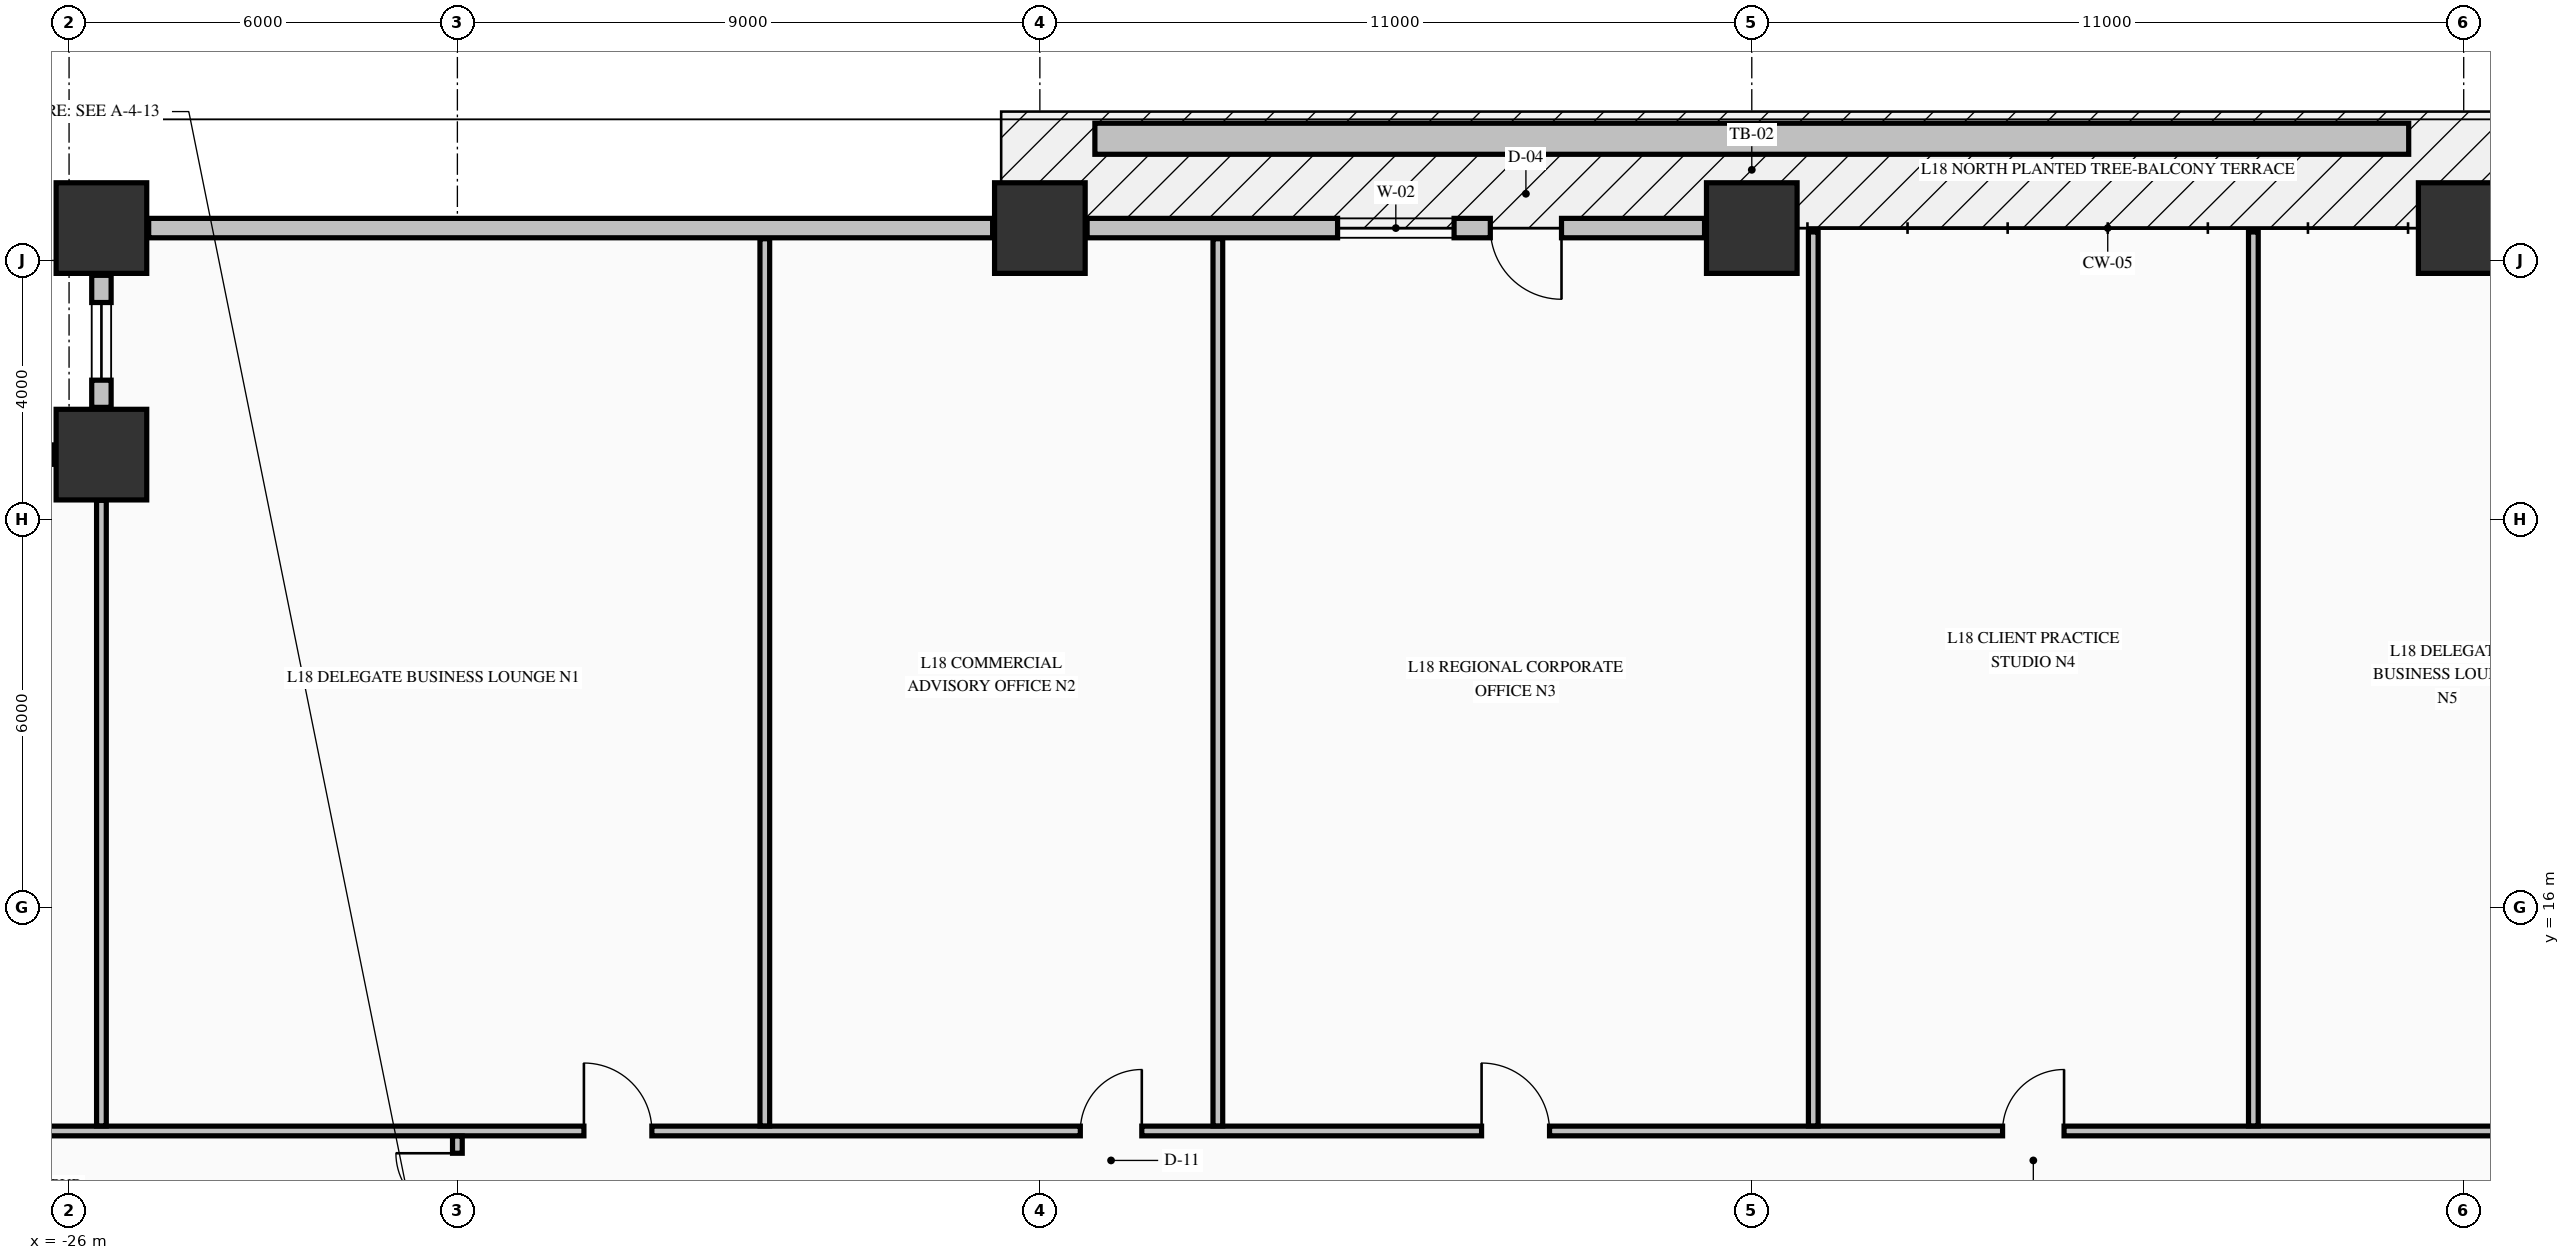
"""IFC4 building model, lengths in metres.
Left out: names, types, materials, properties, quantities, classifications, styles, units other than length and angle.
Written with IfcOpenShell. Run it as: python <this file> out.ifc"""

import sys

from ifc_helpers import new_model, si_unit, direction, frame, frame_2d, origin, origin_2d, place, context, subcontext, project, spatial, rectangle, extrude, element, fill, save


model = new_model("IFC4")
c1 = context("Model", 3, precision=1e-05, world=origin(), true_north=direction((0.0, 1.0)))
c2 = subcontext(c1, "Body", "Model", "MODEL_VIEW")
j1 = project(units=[si_unit("LENGTHUNIT", "METRE"), si_unit("PLANEANGLEUNIT", "RADIAN")], contexts=[c1])
p1 = place(None, origin())
s1 = spatial("IfcSite", under=j1, at=p1, CompositionType="ELEMENT")
p2 = place(p1, origin())
s2 = spatial("IfcBuilding", under=s1, at=p2, CompositionType="ELEMENT")
p3 = place(p2, frame((0.0, 0.0, 75.04)))
s3 = spatial("IfcBuildingStorey", under=s2, at=p3, CompositionType="ELEMENT", Elevation=75.04)
for number, where, z_axis, x_axis in (
    (1, (-25.5, 26.5, -0.25), (0.0, 0.0, 1.0), (1.0, 0.0, 0.0)),
    (2, (-11.0, 26.5, -0.25), (0.0, 0.0, 1.0), (1.0, 0.0, 0.0)),
    (3, (0.0, 26.5, -0.25), (0.0, 0.0, 1.0), (1.0, 0.0, 0.0)),
    (4, (11.0, 26.5, -0.25), (0.0, 0.0, 1.0), (1.0, 0.0, 0.0)),
    (5, (-25.5, 23.0, -0.25), (0.0, 0.0, 1.0), (1.0, 0.0, 0.0)),
):
    element("IfcColumn", number, at=place(p3, frame(where, z_axis=z_axis, x_axis=x_axis)), inside=s3, PredefinedType="COLUMN", context=c2, shape_type="SweptSolid", body=[
        extrude(rectangle(XDim=1.4, YDim=1.4, at=origin_2d()), origin(), (0.0, 0.0, 1.0), 3.57),
    ])
p4 = place(p3, frame((-25.5, 25.77, 0.0), z_axis=(0.0, 0.0, 1.0), x_axis=(0.0, -1.0, 0.0)))
e6 = element("IfcWall", 6, at=p4, inside=s3, PredefinedType="STANDARD", context=c2, shape_type="SweptSolid", body=[
    extrude(rectangle(XDim=2.04, YDim=0.3, at=frame_2d((1.02, 0.0))), origin(), (0.0, 0.0, 1.0), 2.712),
])
p5 = place(p4, frame((0.42, 0.0, 0.82)))
e7 = element("IfcOpeningElement", 7, at=p5, cuts=e6, PredefinedType="OPENING", context=c2, shape_type="SweptSolid", body=[
    extrude(rectangle(XDim=1.2, YDim=1.65, at=frame_2d((0.6, 0.825))), frame((0.0, 0.16, 0.0), z_axis=(0.0, -1.0, 0.0), x_axis=(1.0, 0.0, 0.0)), (0.0, 0.0, 1.0), 0.32),
])
p6 = place(p3, frame((-26.23, 23.0, 0.0), z_axis=(0.0, 0.0, 1.0), x_axis=(-1.0, 0.0, 0.0)))
e8 = element("IfcWall", 8, at=p6, inside=s3, PredefinedType="STANDARD", context=c2, shape_type="SweptSolid", body=[
    extrude(rectangle(XDim=2.04, YDim=0.3, at=frame_2d((1.02, 0.0))), origin(), (0.0, 0.0, 1.0), 2.712),
])
p7 = place(p6, frame((0.42, 0.0, 0.82)))
e9 = element("IfcOpeningElement", 9, at=p7, cuts=e8, PredefinedType="OPENING", context=c2, shape_type="SweptSolid", body=[
    extrude(rectangle(XDim=1.2, YDim=1.65, at=frame_2d((0.6, 0.825))), frame((0.0, 0.16, 0.0), z_axis=(0.0, -1.0, 0.0), x_axis=(1.0, 0.0, 0.0)), (0.0, 0.0, 1.0), 0.32),
])
p8 = place(p3, frame((-11.73, 26.5, 0.0), z_axis=(0.0, 0.0, 1.0), x_axis=(-1.0, 0.0, 0.0)))
e10 = element("IfcWall", 10, at=p8, inside=s3, PredefinedType="STANDARD", context=c2, shape_type="SweptSolid", body=[
    extrude(rectangle(XDim=13.04, YDim=0.3, at=frame_2d((6.52, 0.0))), origin(), (0.0, 0.0, 1.0), 2.712),
])
p9 = place(p3, frame((-0.73, 26.5, 0.0), z_axis=(0.0, 0.0, 1.0), x_axis=(-1.0, 0.0, 0.0)))
e11 = element("IfcWall", 11, at=p9, inside=s3, PredefinedType="STANDARD", context=c2, shape_type="SweptSolid", body=[
    extrude(rectangle(XDim=9.54, YDim=0.3, at=frame_2d((4.77, 0.0))), origin(), (0.0, 0.0, 1.0), 2.712),
])
p10 = place(p9, frame((2.21, 0.0, 0.0)))
e12 = element("IfcOpeningElement", 12, at=p10, cuts=e11, PredefinedType="OPENING", context=c2, shape_type="SweptSolid", body=[
    extrude(rectangle(XDim=1.1, YDim=2.15, at=frame_2d((0.55, 1.075))), frame((0.0, 0.16, 0.0), z_axis=(0.0, -1.0, 0.0), x_axis=(1.0, 0.0, 0.0)), (0.0, 0.0, 1.0), 0.32),
])
p11 = place(p9, frame((3.87, 0.0, 0.78)))
e13 = element("IfcOpeningElement", 13, at=p11, cuts=e11, PredefinedType="OPENING", context=c2, shape_type="SweptSolid", body=[
    extrude(rectangle(XDim=1.8, YDim=1.72, at=frame_2d((0.9, 0.86))), frame((0.0, 0.16, 0.0), z_axis=(0.0, -1.0, 0.0), x_axis=(1.0, 0.0, 0.0)), (0.0, 0.0, 1.0), 0.32),
])
p12 = place(p3, frame((-28.835, 12.55, 0.0), z_axis=(0.0, 0.0, 1.0), x_axis=(1.0, 0.0, 0.0)))
e14 = element("IfcWall", 14, at=p12, inside=s3, PredefinedType="PARTITIONING", context=c2, shape_type="SweptSolid", body=[
    extrude(rectangle(XDim=52.67, YDim=0.15, at=frame_2d((26.335, 0.0))), origin(), (0.0, 0.0, 1.0), 3.32),
])
p13 = place(p12, frame((10.79, 0.0, 0.0)))
e15 = element("IfcOpeningElement", 15, at=p13, cuts=e14, PredefinedType="OPENING", context=c2, shape_type="SweptSolid", body=[
    extrude(rectangle(XDim=1.05, YDim=2.15, at=frame_2d((0.525, 1.075))), frame((0.0, 0.085, 0.0), z_axis=(0.0, -1.0, 0.0), x_axis=(1.0, 0.0, 0.0)), (0.0, 0.0, 1.0), 0.17),
])
p14 = place(p12, frame((18.46, 0.0, 0.0)))
e16 = element("IfcOpeningElement", 16, at=p14, cuts=e14, PredefinedType="OPENING", context=c2, shape_type="SweptSolid", body=[
    extrude(rectangle(XDim=0.95, YDim=2.15, at=frame_2d((0.475, 1.075))), frame((0.0, 0.085, 0.0), z_axis=(0.0, -1.0, 0.0), x_axis=(1.0, 0.0, 0.0)), (0.0, 0.0, 1.0), 0.17),
])
p15 = place(p12, frame((24.66, 0.0, 0.0)))
e17 = element("IfcOpeningElement", 17, at=p15, cuts=e14, PredefinedType="OPENING", context=c2, shape_type="SweptSolid", body=[
    extrude(rectangle(XDim=1.05, YDim=2.15, at=frame_2d((0.525, 1.075))), frame((0.0, 0.085, 0.0), z_axis=(0.0, -1.0, 0.0), x_axis=(1.0, 0.0, 0.0)), (0.0, 0.0, 1.0), 0.17),
])
p16 = place(p12, frame((32.71, 0.0, 0.0)))
e18 = element("IfcOpeningElement", 18, at=p16, cuts=e14, PredefinedType="OPENING", context=c2, shape_type="SweptSolid", body=[
    extrude(rectangle(XDim=0.95, YDim=2.15, at=frame_2d((0.475, 1.075))), frame((0.0, 0.085, 0.0), z_axis=(0.0, -1.0, 0.0), x_axis=(1.0, 0.0, 0.0)), (0.0, 0.0, 1.0), 0.17),
])
p17 = place(p12, frame((40.46, 0.0, 0.0)))
e19 = element("IfcOpeningElement", 19, at=p17, cuts=e14, PredefinedType="OPENING", context=c2, shape_type="SweptSolid", body=[
    extrude(rectangle(XDim=0.95, YDim=2.15, at=frame_2d((0.475, 1.075))), frame((0.0, 0.085, 0.0), z_axis=(0.0, -1.0, 0.0), x_axis=(1.0, 0.0, 0.0)), (0.0, 0.0, 1.0), 0.17),
])
p18 = place(p12, frame((45.13, 0.0, 0.0)))
e20 = element("IfcOpeningElement", 20, at=p18, cuts=e14, PredefinedType="OPENING", context=c2, shape_type="SweptSolid", body=[
    extrude(rectangle(XDim=0.95, YDim=2.15, at=frame_2d((0.475, 1.075))), frame((0.0, 0.085, 0.0), z_axis=(0.0, -1.0, 0.0), x_axis=(1.0, 0.0, 0.0)), (0.0, 0.0, 1.0), 0.17),
])
p19 = place(p3, frame((-25.5, 12.628, 0.0), z_axis=(0.0, 0.0, 1.0), x_axis=(0.0, 1.0, 0.0)))
e21 = element("IfcWall", 21, at=p19, inside=s3, PredefinedType="PARTITIONING", context=c2, shape_type="SweptSolid", body=[
    extrude(rectangle(XDim=9.666, YDim=0.15, at=frame_2d((4.833, 0.0))), origin(), (0.0, 0.0, 1.0), 3.32),
])
p20 = place(p3, frame((-20.0, 11.106, 0.0), z_axis=(0.0, 0.0, 1.0), x_axis=(0.0, 1.0, 0.0)))
e22 = element("IfcWall", 22, at=p20, inside=s3, PredefinedType="PARTITIONING", context=c2, shape_type="SweptSolid", body=[
    extrude(rectangle(XDim=1.366, YDim=0.15, at=frame_2d((0.683, 0.0))), origin(), (0.0, 0.0, 1.0), 2.66),
])
p21 = place(p20, frame((0.15, 0.0, 0.0)))
e23 = element("IfcOpeningElement", 23, at=p21, cuts=e22, PredefinedType="OPENING", context=c2, shape_type="SweptSolid", body=[
    extrude(rectangle(XDim=0.95, YDim=2.15, at=frame_2d((0.475, 1.075))), frame((0.0, 0.085, 0.0), z_axis=(0.0, -1.0, 0.0), x_axis=(1.0, 0.0, 0.0)), (0.0, 0.0, 1.0), 0.17),
])
for number, where, z_axis, x_axis in (
    (24, (-15.25, 12.628, 0.0), (0.0, 0.0, 1.0), (0.0, 1.0, 0.0)),
    (25, (-8.25, 12.628, 0.0), (0.0, 0.0, 1.0), (0.0, 1.0, 0.0)),
):
    element("IfcWall", number, at=place(p3, frame(where, z_axis=z_axis, x_axis=x_axis)), inside=s3, PredefinedType="PARTITIONING", context=c2, shape_type="SweptSolid", body=[
        extrude(rectangle(XDim=13.707, YDim=0.15, at=frame_2d((6.854, 0.0))), origin(), (0.0, 0.0, 1.0), 3.32),
    ])
for number, where, z_axis, x_axis in (
    (26, (0.95, 12.628, 0.0), (0.0, 0.0, 1.0), (0.0, 1.0, 0.0)),
    (27, (7.75, 12.628, 0.0), (0.0, 0.0, 1.0), (0.0, 1.0, 0.0)),
):
    element("IfcWall", number, at=place(p3, frame(where, z_axis=z_axis, x_axis=x_axis)), inside=s3, PredefinedType="PARTITIONING", context=c2, shape_type="SweptSolid", body=[
        extrude(rectangle(XDim=13.812, YDim=0.15, at=frame_2d((6.906, 0.0))), origin(), (0.0, 0.0, 1.0), 3.32),
    ])
p22 = place(p3, frame((-10.15, 27.88, -0.04), z_axis=(0.0, 0.0, 1.0), x_axis=(1.0, 0.0, 0.0)))
e28 = element("IfcWall", 28, at=p22, inside=s3, PredefinedType="PARAPET", context=c2, shape_type="SweptSolid", body=[
    extrude(rectangle(XDim=20.3, YDim=0.48, at=frame_2d((10.15, 0.0))), origin(), (0.0, 0.0, 1.0), 0.52),
])
p23 = place(p5, origin())
e29 = element("IfcWindow", 29, at=p23, inside=s3, PartitioningType="SINGLE_PANEL", PredefinedType="WINDOW", context=c2, shape_type="SweptSolid", body=[
    extrude(rectangle(XDim=1.2, YDim=1.65, at=frame_2d((0.6, 0.825))), frame((0.0, 0.03, 0.0), z_axis=(0.0, -1.0, 0.0), x_axis=(1.0, 0.0, 0.0)), (0.0, 0.0, 1.0), 0.06),
])
fill(e7, e29)
p24 = place(p10, origin())
e30 = element("IfcDoor", 30, at=p24, inside=s3, OperationType="SINGLE_SWING_LEFT", PredefinedType="DOOR", context=c2, shape_type="SweptSolid", body=[
    extrude(rectangle(XDim=1.1, YDim=2.15, at=frame_2d((0.55, 1.075))), frame((0.0, 0.025, 0.0), z_axis=(0.0, -1.0, 0.0), x_axis=(1.0, 0.0, 0.0)), (0.0, 0.0, 1.0), 0.05),
])
fill(e12, e30)
p25 = place(p11, origin())
e31 = element("IfcWindow", 31, at=p25, inside=s3, PartitioningType="SINGLE_PANEL", PredefinedType="WINDOW", context=c2, shape_type="SweptSolid", body=[
    extrude(rectangle(XDim=1.8, YDim=1.72, at=frame_2d((0.9, 0.86))), frame((0.0, 0.03, 0.0), z_axis=(0.0, -1.0, 0.0), x_axis=(1.0, 0.0, 0.0)), (0.0, 0.0, 1.0), 0.06),
])
fill(e13, e31)
p26 = place(p13, origin())
e32 = element("IfcDoor", 32, at=p26, inside=s3, OperationType="SINGLE_SWING_LEFT", PredefinedType="DOOR", context=c2, shape_type="SweptSolid", body=[
    extrude(rectangle(XDim=1.05, YDim=2.15, at=frame_2d((0.525, 1.075))), frame((0.0, 0.025, 0.0), z_axis=(0.0, -1.0, 0.0), x_axis=(1.0, 0.0, 0.0)), (0.0, 0.0, 1.0), 0.05),
])
fill(e15, e32)
p27 = place(p14, origin())
e33 = element("IfcDoor", 33, at=p27, inside=s3, OperationType="SINGLE_SWING_RIGHT", PredefinedType="DOOR", context=c2, shape_type="SweptSolid", body=[
    extrude(rectangle(XDim=0.95, YDim=2.15, at=frame_2d((0.475, 1.075))), frame((0.0, 0.025, 0.0), z_axis=(0.0, -1.0, 0.0), x_axis=(1.0, 0.0, 0.0)), (0.0, 0.0, 1.0), 0.05),
])
fill(e16, e33)
p28 = place(p15, origin())
e34 = element("IfcDoor", 34, at=p28, inside=s3, OperationType="SINGLE_SWING_LEFT", PredefinedType="DOOR", context=c2, shape_type="SweptSolid", body=[
    extrude(rectangle(XDim=1.05, YDim=2.15, at=frame_2d((0.525, 1.075))), frame((0.0, 0.025, 0.0), z_axis=(0.0, -1.0, 0.0), x_axis=(1.0, 0.0, 0.0)), (0.0, 0.0, 1.0), 0.05),
])
fill(e17, e34)
p29 = place(p16, origin())
e35 = element("IfcDoor", 35, at=p29, inside=s3, OperationType="SINGLE_SWING_RIGHT", PredefinedType="DOOR", context=c2, shape_type="SweptSolid", body=[
    extrude(rectangle(XDim=0.95, YDim=2.15, at=frame_2d((0.475, 1.075))), frame((0.0, 0.025, 0.0), z_axis=(0.0, -1.0, 0.0), x_axis=(1.0, 0.0, 0.0)), (0.0, 0.0, 1.0), 0.05),
])
fill(e18, e35)
p30 = place(p21, origin())
e36 = element("IfcDoor", 36, at=p30, inside=s3, OperationType="SINGLE_SWING_RIGHT", PredefinedType="DOOR", context=c2, shape_type="SweptSolid", body=[
    extrude(rectangle(XDim=0.95, YDim=2.15, at=frame_2d((0.475, 1.075))), frame((0.0, 0.025, 0.0), z_axis=(0.0, -1.0, 0.0), x_axis=(1.0, 0.0, 0.0)), (0.0, 0.0, 1.0), 0.05),
])
fill(e23, e36)
save(model, sys.argv[1])
